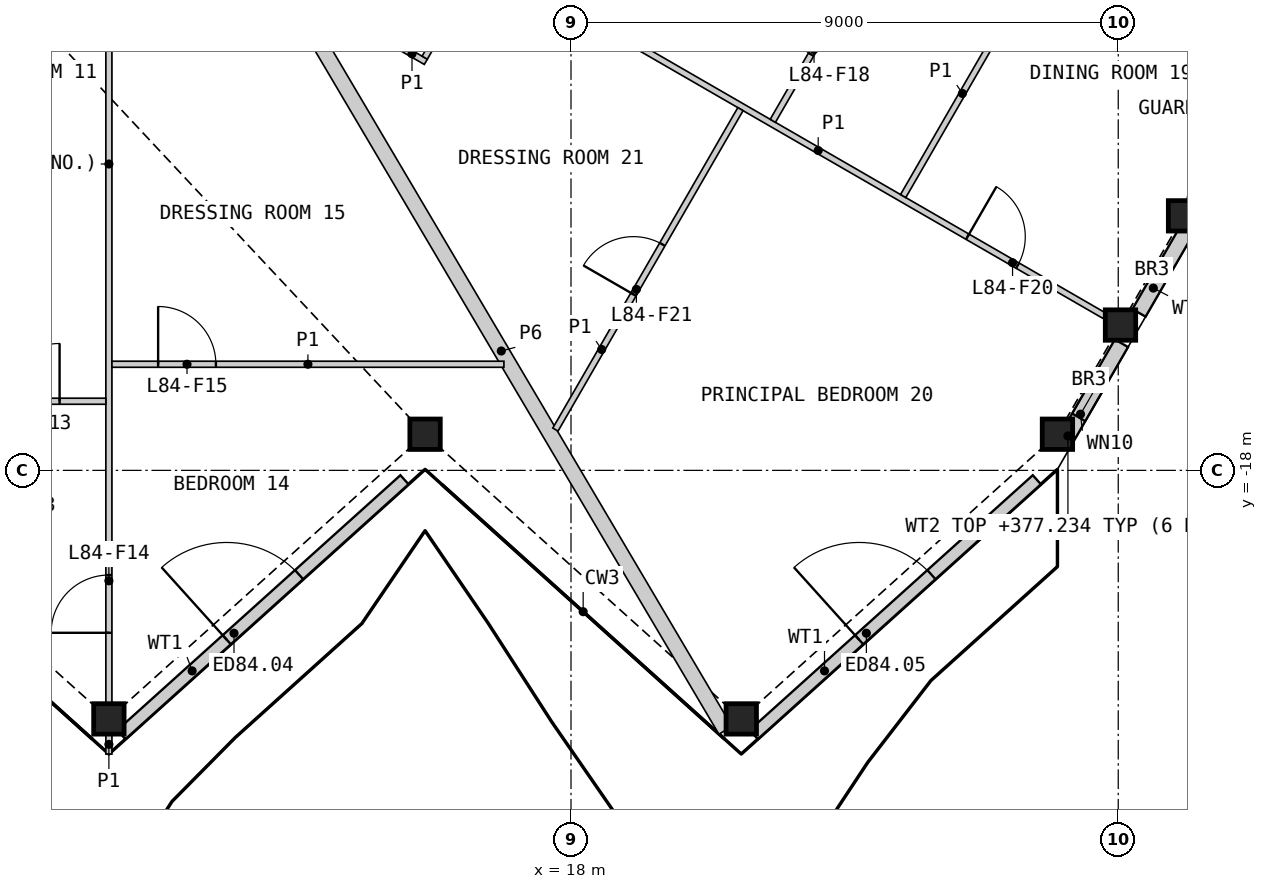
"""IFC4 building model, lengths in metres.
Left out: names, types, materials, properties, quantities, classifications, styles, units other than length and angle.
Written with IfcOpenShell. Run it as: python <this file> out.ifc"""

import sys

from ifc_helpers import new_model, si_unit, direction, frame, frame_2d, origin, origin_2d, place, context, subcontext, project, spatial, rectangle, hollow_rectangle, extrude, element, fill, save


model = new_model("IFC4")
c1 = context("Model", 3, precision=1e-05, world=origin(), true_north=direction((0.0, 1.0)))
c2 = subcontext(c1, "Body", "Model", "MODEL_VIEW")
j1 = project(units=[si_unit("LENGTHUNIT", "METRE"), si_unit("PLANEANGLEUNIT", "RADIAN")], contexts=[c1])
p1 = place(None, origin())
s1 = spatial("IfcSite", under=j1, at=p1, CompositionType="ELEMENT")
p2 = place(p1, origin())
s2 = spatial("IfcBuilding", under=s1, at=p2, CompositionType="ELEMENT")
p3 = place(p2, frame((0.0, 0.0, 374.6)))
s3 = spatial("IfcBuildingStorey", under=s2, at=p3, CompositionType="ELEMENT", Elevation=374.6)
for number, where, z_axis, x_axis in (
    (1, (10.4, -22.088, 0.0), (0.0, 0.0, 1.0), (1.0, 0.0, 0.0)),
    (2, (15.6, -17.406, 0.0), (0.0, 0.0, 1.0), (1.0, 0.0, 0.0)),
    (3, (20.8, -22.088, 0.0), (0.0, 0.0, 1.0), (1.0, 0.0, 0.0)),
    (4, (26.0, -17.406, 0.0), (0.0, 0.0, 1.0), (1.0, 0.0, 0.0)),
    (5, (27.037, -15.61, 0.0), (0.0, 0.0, 1.0), (1.0, 0.0, 0.0)),
    (6, (28.074, -13.814, 0.0), (0.0, 0.0, 1.0), (1.0, 0.0, 0.0)),
):
    element("IfcColumn", number, at=place(p3, frame(where, z_axis=z_axis, x_axis=x_axis)), inside=s3, PredefinedType="COLUMN", context=c2, shape_type="SweptSolid", body=[
        extrude(hollow_rectangle(XDim=0.5, YDim=0.5, WallThickness=0.03, at=origin_2d()), origin(), (0.0, 0.0, 1.0), 3.4),
    ])
p4 = place(p3, frame((10.605, -22.346, 0.0), z_axis=(0.0, 0.0, 1.0), x_axis=(0.743137181878, 0.669139095339, 0.0)))
e7 = element("IfcWall", 7, at=p4, inside=s3, PredefinedType="SOLIDWALL", context=c2, shape_type="SweptSolid", body=[
    extrude(rectangle(XDim=6.265, YDim=0.2, at=frame_2d((3.133, 0.0))), origin(), (0.0, 0.0, 1.0), 2.634),
])
p5 = place(p4, frame((2.333, 0.0, 0.0)))
e8 = element("IfcOpeningElement", 8, at=p5, cuts=e7, PredefinedType="OPENING", context=c2, shape_type="SweptSolid", body=[
    extrude(rectangle(XDim=1.6, YDim=2.25, at=frame_2d((0.8, 1.125))), frame((0.0, 0.11, 0.0), z_axis=(0.0, -1.0, 0.0), x_axis=(1.0, 0.0, 0.0)), (0.0, 0.0, 1.0), 0.22),
])
p6 = place(p3, frame((21.005, -22.346, 0.0), z_axis=(0.0, 0.0, 1.0), x_axis=(0.743137181878, 0.669139095339, 0.0)))
e9 = element("IfcWall", 9, at=p6, inside=s3, PredefinedType="SOLIDWALL", context=c2, shape_type="SweptSolid", body=[
    extrude(rectangle(XDim=6.265, YDim=0.2, at=frame_2d((3.133, 0.0))), origin(), (0.0, 0.0, 1.0), 2.634),
])
p7 = place(p6, frame((2.333, 0.0, 0.0)))
e10 = element("IfcOpeningElement", 10, at=p7, cuts=e9, PredefinedType="OPENING", context=c2, shape_type="SweptSolid", body=[
    extrude(rectangle(XDim=1.6, YDim=2.25, at=frame_2d((0.8, 1.125))), frame((0.0, 0.11, 0.0), z_axis=(0.0, -1.0, 0.0), x_axis=(1.0, 0.0, 0.0)), (0.0, 0.0, 1.0), 0.22),
])
p8 = place(p3, frame((26.075, -17.604, 0.0), z_axis=(0.0, 0.0, 1.0), x_axis=(0.500017700655, 0.866015184065, 0.0)))
e11 = element("IfcWall", 11, at=p8, inside=s3, PredefinedType="SOLIDWALL", context=c2, shape_type="SweptSolid", body=[
    extrude(rectangle(XDim=1.957, YDim=0.25, at=frame_2d((0.978, 0.0))), origin(), (0.0, 0.0, 1.0), 2.634),
])
p9 = place(p8, frame((0.55, 0.0, 0.4)))
e12 = element("IfcOpeningElement", 12, at=p9, cuts=e11, PredefinedType="OPENING", context=c2, shape_type="SweptSolid", body=[
    extrude(rectangle(XDim=0.6, YDim=0.6, at=frame_2d((0.3, 0.3))), frame((0.0, 0.135, 0.0), z_axis=(0.0, -1.0, 0.0), x_axis=(1.0, 0.0, 0.0)), (0.0, 0.0, 1.0), 0.27),
])
p10 = place(p3, frame((27.342, -15.41, 0.0), z_axis=(0.0, 0.0, 1.0), x_axis=(0.500044242988, 0.865999858577, 0.0)))
e13 = element("IfcWall", 13, at=p10, inside=s3, PredefinedType="SOLIDWALL", context=c2, shape_type="SweptSolid", body=[
    extrude(rectangle(XDim=1.883, YDim=0.25, at=frame_2d((0.941, 0.0))), origin(), (0.0, 0.0, 1.0), 2.634),
])
p11 = place(p3, frame((13.167, -9.798, 0.0), z_axis=(0.0, 0.0, 1.0), x_axis=(0.508707178493, -0.860939606796, 0.0)))
e14 = element("IfcWall", 14, at=p11, inside=s3, PredefinedType="PARTITIONING", context=c2, shape_type="SweptSolid", body=[
    extrude(rectangle(XDim=14.493, YDim=0.25, at=frame_2d((7.247, 0.0))), origin(), (0.0, 0.0, 1.0), 2.33),
])
p12 = place(p3, frame((10.4, -21.828, 0.0), z_axis=(0.0, 0.0, 1.0), x_axis=(0.0, 1.0, 0.0)))
e15 = element("IfcWall", 15, at=p12, inside=s3, PredefinedType="PARTITIONING", context=c2, shape_type="SweptSolid", body=[
    extrude(rectangle(XDim=11.822, YDim=0.1, at=frame_2d((5.911, 0.0))), origin(), (0.0, 0.0, 1.0), 2.33),
])
p13 = place(p12, frame((1.156, 0.0, 0.0)))
e16 = element("IfcOpeningElement", 16, at=p13, cuts=e15, PredefinedType="OPENING", context=c2, shape_type="SweptSolid", body=[
    extrude(rectangle(XDim=0.95, YDim=2.1, at=frame_2d((0.475, 1.05))), frame((0.0, 0.06, 0.0), z_axis=(0.0, -1.0, 0.0), x_axis=(1.0, 0.0, 0.0)), (0.0, 0.0, 1.0), 0.12),
])
p14 = place(p3, frame((17.354, -10.019, 0.0), z_axis=(0.0, 0.0, 1.0), x_axis=(0.866019680922, -0.500009912158, 0.0)))
e17 = element("IfcWall", 17, at=p14, inside=s3, PredefinedType="PARTITIONING", context=c2, shape_type="SweptSolid", body=[
    extrude(rectangle(XDim=10.881, YDim=0.1, at=frame_2d((5.44, 0.0))), origin(), (0.0, 0.0, 1.0), 2.33),
])
p15 = place(p14, frame((8.276, 0.0, 0.0)))
e18 = element("IfcOpeningElement", 18, at=p15, cuts=e17, PredefinedType="OPENING", context=c2, shape_type="SweptSolid", body=[
    extrude(rectangle(XDim=0.95, YDim=2.1, at=frame_2d((0.475, 1.05))), frame((0.0, 0.06, 0.0), z_axis=(0.0, -1.0, 0.0), x_axis=(1.0, 0.0, 0.0)), (0.0, 0.0, 1.0), 0.12),
])
p16 = place(p3, frame((23.463, -13.488, 0.0), z_axis=(0.0, 0.0, 1.0), x_axis=(0.500012519194, 0.866018175704, 0.0)))
e19 = element("IfcWall", 19, at=p16, inside=s3, PredefinedType="PARTITIONING", context=c2, shape_type="SweptSolid", body=[
    extrude(rectangle(XDim=7.796, YDim=0.1, at=frame_2d((3.898, 0.0))), origin(), (0.0, 0.0, 1.0), 2.33),
])
p17 = place(p16, frame((3.473, 0.0, 0.0)))
e20 = element("IfcOpeningElement", 20, at=p17, cuts=e19, PredefinedType="OPENING", context=c2, shape_type="SweptSolid", body=[
    extrude(rectangle(XDim=0.95, YDim=2.1, at=frame_2d((0.475, 1.05))), frame((0.0, 0.06, 0.0), z_axis=(0.0, -1.0, 0.0), x_axis=(1.0, 0.0, 0.0)), (0.0, 0.0, 1.0), 0.12),
])
p18 = place(p3, frame((21.319, -12.251, 0.0), z_axis=(0.0, 0.0, 1.0), x_axis=(0.499999833739, 0.866025499775, 0.0)))
e21 = element("IfcWall", 21, at=p18, inside=s3, PredefinedType="PARTITIONING", context=c2, shape_type="SweptSolid", body=[
    extrude(rectangle(XDim=6.4, YDim=0.1, at=frame_2d((3.2, 0.0))), origin(), (0.0, 0.0, 1.0), 2.33),
])
p19 = place(p18, frame((1.26, 0.0, 0.0)))
e22 = element("IfcOpeningElement", 22, at=p19, cuts=e21, PredefinedType="OPENING", context=c2, shape_type="SweptSolid", body=[
    extrude(rectangle(XDim=0.95, YDim=2.1, at=frame_2d((0.475, 1.05))), frame((0.0, 0.06, 0.0), z_axis=(0.0, -1.0, 0.0), x_axis=(1.0, 0.0, 0.0)), (0.0, 0.0, 1.0), 0.12),
])
p20 = place(p3, frame((10.45, -16.255, 0.0), z_axis=(0.0, 0.0, 1.0), x_axis=(1.0, 0.0, 0.0)))
e23 = element("IfcWall", 23, at=p20, inside=s3, PredefinedType="PARTITIONING", context=c2, shape_type="SweptSolid", body=[
    extrude(rectangle(XDim=6.447, YDim=0.1, at=frame_2d((3.223, 0.0))), origin(), (0.0, 0.0, 1.0), 2.33),
])
p21 = place(p20, frame((0.76, 0.0, 0.0)))
e24 = element("IfcOpeningElement", 24, at=p21, cuts=e23, PredefinedType="OPENING", context=c2, shape_type="SweptSolid", body=[
    extrude(rectangle(XDim=0.95, YDim=2.1, at=frame_2d((0.475, 1.05))), frame((0.0, 0.06, 0.0), z_axis=(0.0, -1.0, 0.0), x_axis=(1.0, 0.0, 0.0)), (0.0, 0.0, 1.0), 0.12),
])
p22 = place(p3, frame((17.744, -17.329, 0.0), z_axis=(0.0, 0.0, 1.0), x_axis=(0.49997479812, 0.866039953608, 0.0)))
e25 = element("IfcWall", 25, at=p22, inside=s3, PredefinedType="PARTITIONING", context=c2, shape_type="SweptSolid", body=[
    extrude(rectangle(XDim=6.086, YDim=0.1, at=frame_2d((3.043, 0.0))), origin(), (0.0, 0.0, 1.0), 2.33),
])
p23 = place(p22, frame((2.568, 0.0, 0.0)))
e26 = element("IfcOpeningElement", 26, at=p23, cuts=e25, PredefinedType="OPENING", context=c2, shape_type="SweptSolid", body=[
    extrude(rectangle(XDim=0.95, YDim=2.1, at=frame_2d((0.475, 1.05))), frame((0.0, 0.06, 0.0), z_axis=(0.0, -1.0, 0.0), x_axis=(1.0, 0.0, 0.0)), (0.0, 0.0, 1.0), 0.12),
])
p24 = place(p3, frame((5.325, -16.863, 0.0), z_axis=(0.0, 0.0, 1.0), x_axis=(1.0, 0.0, 0.0)))
e27 = element("IfcWall", 27, at=p24, inside=s3, PredefinedType="PARTITIONING", context=c2, shape_type="SweptSolid", body=[
    extrude(rectangle(XDim=5.025, YDim=0.1, at=frame_2d((2.513, 0.0))), origin(), (0.0, 0.0, 1.0), 2.33),
])
p25 = place(p24, frame((3.314, 0.0, 0.0)))
e28 = element("IfcOpeningElement", 28, at=p25, cuts=e27, PredefinedType="OPENING", context=c2, shape_type="SweptSolid", body=[
    extrude(rectangle(XDim=0.95, YDim=2.1, at=frame_2d((0.475, 1.05))), frame((0.0, 0.06, 0.0), z_axis=(0.0, -1.0, 0.0), x_axis=(1.0, 0.0, 0.0)), (0.0, 0.0, 1.0), 0.12),
])
p26 = place(p3, frame((13.339, -9.968, 0.0), z_axis=(0.0, 0.0, 1.0), x_axis=(0.866013657776, -0.500020344131, 0.0)))
e29 = element("IfcWall", 29, at=p26, inside=s3, PredefinedType="PARTITIONING", context=c2, shape_type="SweptSolid", body=[
    extrude(rectangle(XDim=2.625, YDim=0.1, at=frame_2d((1.312, 0.0))), origin(), (0.0, 0.0, 1.0), 2.33),
])
p27 = place(p3, frame((15.594, -11.212, 0.0), z_axis=(0.0, 0.0, 1.0), x_axis=(0.499958068602, 0.866049611535, 0.0)))
e30 = element("IfcWall", 30, at=p27, inside=s3, PredefinedType="PARTITIONING", context=c2, shape_type="SweptSolid", body=[
    extrude(rectangle(XDim=1.973, YDim=0.1, at=frame_2d((0.987, 0.0))), origin(), (0.0, 0.0, 1.0), 2.33),
])
p28 = place(p3, frame((10.4, -22.666, 0.0), z_axis=(0.0, 0.0, 1.0), x_axis=(0.0, 1.0, 0.0)))
e31 = element("IfcWall", 31, at=p28, inside=s3, PredefinedType="PARTITIONING", context=c2, shape_type="SweptSolid", body=[
    extrude(rectangle(XDim=0.318, YDim=0.1, at=frame_2d((0.159, 0.0))), origin(), (0.0, 0.0, 1.0), 2.33),
])
p29 = place(p5, origin())
e32 = element("IfcDoor", 32, at=p29, inside=s3, OperationType="DOUBLE_DOOR_SINGLE_SWING", PredefinedType="DOOR", context=c2, shape_type="SweptSolid", body=[
    extrude(rectangle(XDim=1.6, YDim=2.25, at=frame_2d((0.8, 1.125))), frame((0.0, 0.025, 0.0), z_axis=(0.0, -1.0, 0.0), x_axis=(1.0, 0.0, 0.0)), (0.0, 0.0, 1.0), 0.05),
])
fill(e8, e32)
p30 = place(p7, origin())
e33 = element("IfcDoor", 33, at=p30, inside=s3, OperationType="DOUBLE_DOOR_SINGLE_SWING", PredefinedType="DOOR", context=c2, shape_type="SweptSolid", body=[
    extrude(rectangle(XDim=1.6, YDim=2.25, at=frame_2d((0.8, 1.125))), frame((0.0, 0.025, 0.0), z_axis=(0.0, -1.0, 0.0), x_axis=(1.0, 0.0, 0.0)), (0.0, 0.0, 1.0), 0.05),
])
fill(e10, e33)
p31 = place(p9, origin())
e34 = element("IfcWindow", 34, at=p31, inside=s3, PartitioningType="SINGLE_PANEL", PredefinedType="WINDOW", context=c2, shape_type="SweptSolid", body=[
    extrude(rectangle(XDim=0.6, YDim=0.6, at=frame_2d((0.3, 0.3))), frame((0.0, 0.03, 0.0), z_axis=(0.0, -1.0, 0.0), x_axis=(1.0, 0.0, 0.0)), (0.0, 0.0, 1.0), 0.06),
])
fill(e12, e34)
p32 = place(p25, origin())
e35 = element("IfcDoor", 35, at=p32, inside=s3, OperationType="SINGLE_SWING_RIGHT", PredefinedType="DOOR", context=c2, shape_type="SweptSolid", body=[
    extrude(rectangle(XDim=0.95, YDim=2.1, at=frame_2d((0.475, 1.05))), frame((0.0, 0.025, 0.0), z_axis=(0.0, -1.0, 0.0), x_axis=(1.0, 0.0, 0.0)), (0.0, 0.0, 1.0), 0.05),
])
fill(e28, e35)
p33 = place(p13, origin())
e36 = element("IfcDoor", 36, at=p33, inside=s3, OperationType="SINGLE_SWING_LEFT", PredefinedType="DOOR", context=c2, shape_type="SweptSolid", body=[
    extrude(rectangle(XDim=0.95, YDim=2.1, at=frame_2d((0.475, 1.05))), frame((0.0, 0.025, 0.0), z_axis=(0.0, -1.0, 0.0), x_axis=(1.0, 0.0, 0.0)), (0.0, 0.0, 1.0), 0.05),
])
fill(e16, e36)
p34 = place(p21, origin())
e37 = element("IfcDoor", 37, at=p34, inside=s3, OperationType="SINGLE_SWING_LEFT", PredefinedType="DOOR", context=c2, shape_type="SweptSolid", body=[
    extrude(rectangle(XDim=0.95, YDim=2.1, at=frame_2d((0.475, 1.05))), frame((0.0, 0.025, 0.0), z_axis=(0.0, -1.0, 0.0), x_axis=(1.0, 0.0, 0.0)), (0.0, 0.0, 1.0), 0.05),
])
fill(e24, e37)
p35 = place(p19, origin())
e38 = element("IfcDoor", 38, at=p35, inside=s3, OperationType="SINGLE_SWING_RIGHT", PredefinedType="DOOR", context=c2, shape_type="SweptSolid", body=[
    extrude(rectangle(XDim=0.95, YDim=2.1, at=frame_2d((0.475, 1.05))), frame((0.0, 0.025, 0.0), z_axis=(0.0, -1.0, 0.0), x_axis=(1.0, 0.0, 0.0)), (0.0, 0.0, 1.0), 0.05),
])
fill(e22, e38)
p36 = place(p15, origin())
e39 = element("IfcDoor", 39, at=p36, inside=s3, OperationType="SINGLE_SWING_LEFT", PredefinedType="DOOR", context=c2, shape_type="SweptSolid", body=[
    extrude(rectangle(XDim=0.95, YDim=2.1, at=frame_2d((0.475, 1.05))), frame((0.0, 0.025, 0.0), z_axis=(0.0, -1.0, 0.0), x_axis=(1.0, 0.0, 0.0)), (0.0, 0.0, 1.0), 0.05),
])
fill(e18, e39)
p37 = place(p23, origin())
e40 = element("IfcDoor", 40, at=p37, inside=s3, OperationType="SINGLE_SWING_LEFT", PredefinedType="DOOR", context=c2, shape_type="SweptSolid", body=[
    extrude(rectangle(XDim=0.95, YDim=2.1, at=frame_2d((0.475, 1.05))), frame((0.0, 0.025, 0.0), z_axis=(0.0, -1.0, 0.0), x_axis=(1.0, 0.0, 0.0)), (0.0, 0.0, 1.0), 0.05),
])
fill(e26, e40)
save(model, sys.argv[1])
